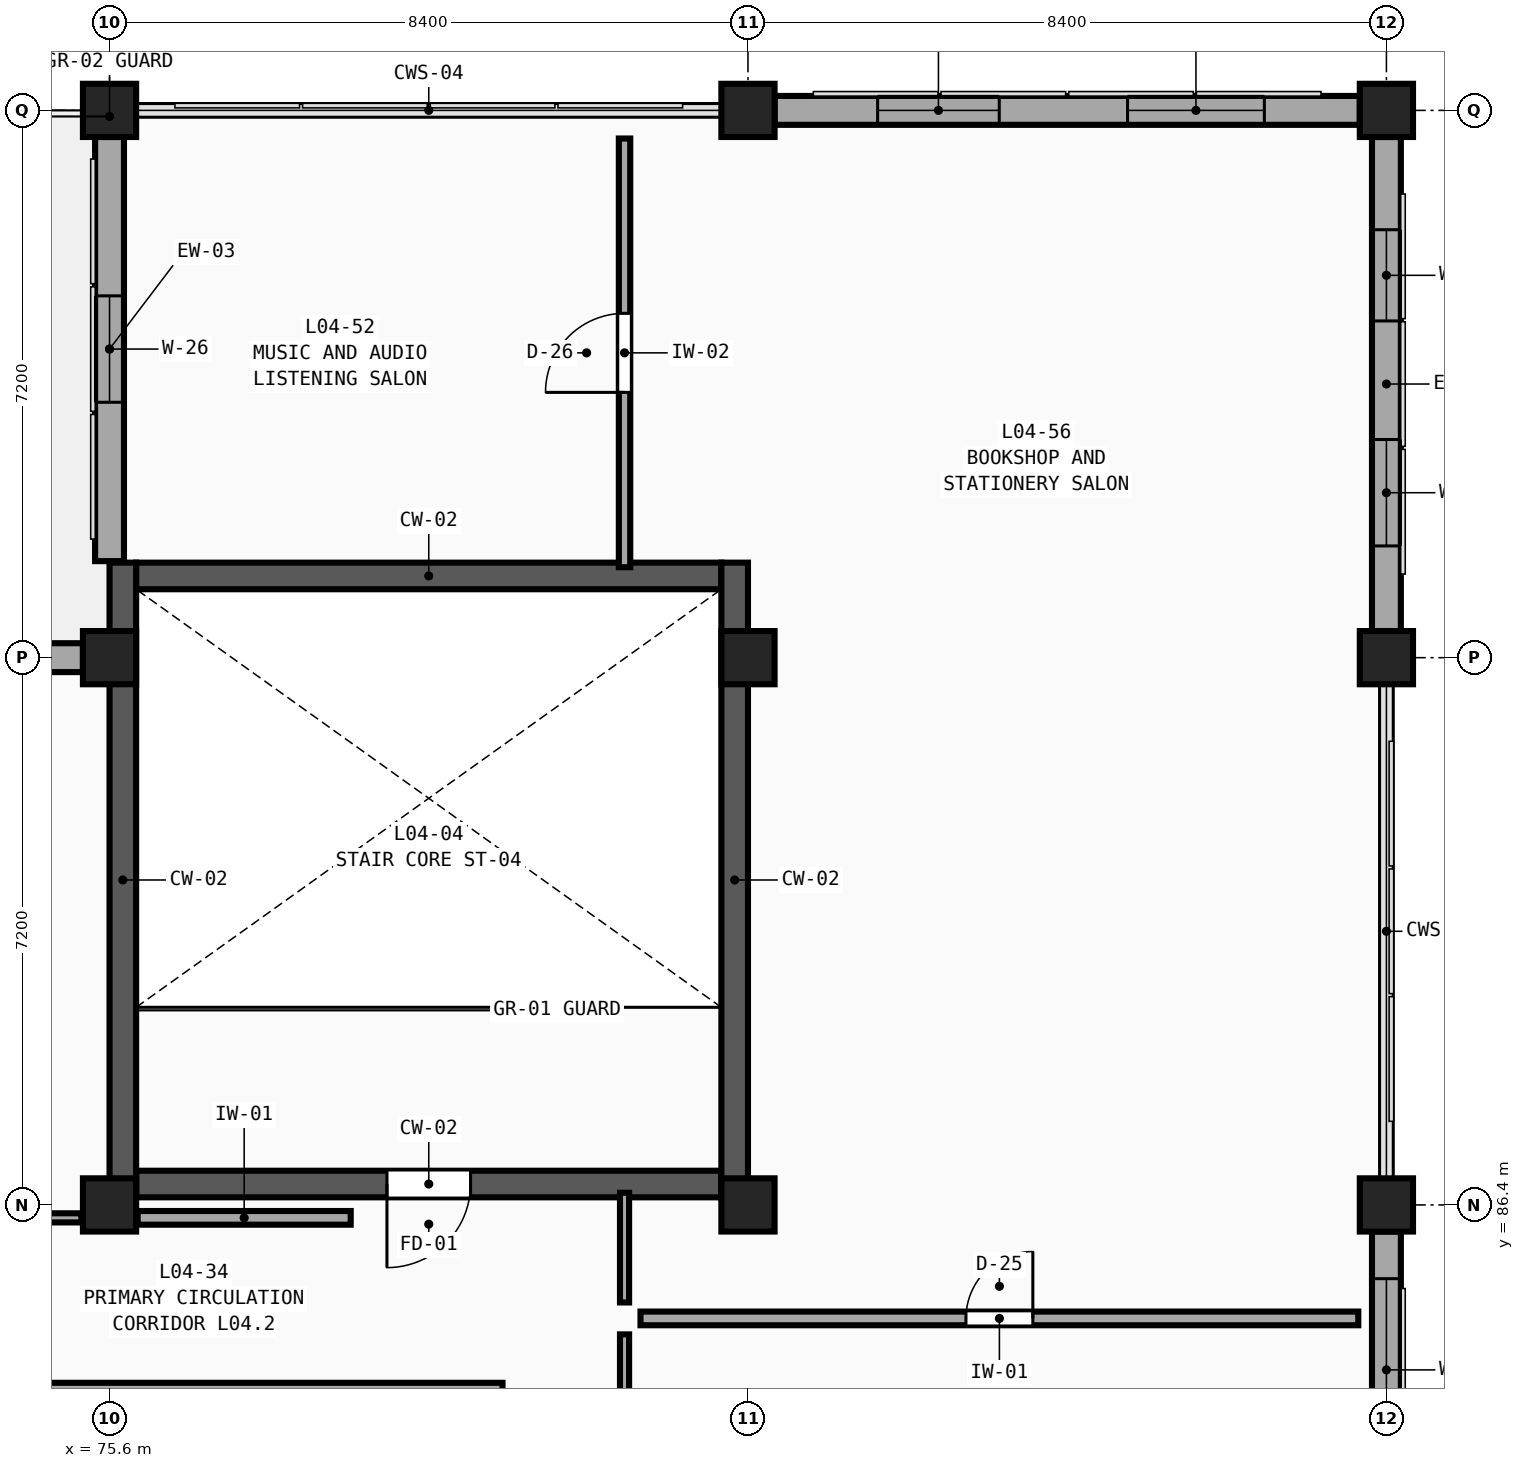
"""IFC4 building model, lengths in metres.
Left out: names, types, materials, properties, quantities, classifications, styles, units other than length and angle.
Written with IfcOpenShell. Run it as: python <this file> out.ifc"""

import sys

from ifc_helpers import new_model, si_unit, direction, frame, frame_2d, origin, origin_2d, place, context, subcontext, project, spatial, rectangle, extrude, element, fill, save


model = new_model("IFC4")
c1 = context("Model", 3, precision=1e-05, world=origin(), true_north=direction((0.0, 1.0)))
c2 = subcontext(c1, "Body", "Model", "MODEL_VIEW")
j1 = project(units=[si_unit("LENGTHUNIT", "METRE"), si_unit("PLANEANGLEUNIT", "RADIAN")], contexts=[c1])
p1 = place(None, origin())
s1 = spatial("IfcSite", under=j1, at=p1, CompositionType="ELEMENT")
p2 = place(p1, origin())
s2 = spatial("IfcBuilding", under=s1, at=p2, CompositionType="ELEMENT")
p3 = place(p2, frame((0.0, 0.0, 18.9)))
s3 = spatial("IfcBuildingStorey", under=s2, at=p3, CompositionType="ELEMENT", Elevation=18.9)
for number, where, z_axis, x_axis in (
    (1, (75.6, 86.4, 0.0), (0.0, 0.0, 1.0), (1.0, 0.0, 0.0)),
    (2, (75.6, 93.6, 0.0), (0.0, 0.0, 1.0), (1.0, 0.0, 0.0)),
    (3, (75.6, 100.8, 0.0), (0.0, 0.0, 1.0), (1.0, 0.0, 0.0)),
    (4, (84.0, 86.4, 0.0), (0.0, 0.0, 1.0), (1.0, 0.0, 0.0)),
    (5, (84.0, 93.6, 0.0), (0.0, 0.0, 1.0), (1.0, 0.0, 0.0)),
    (6, (84.0, 100.8, 0.0), (0.0, 0.0, 1.0), (1.0, 0.0, 0.0)),
    (7, (92.4, 86.4, 0.0), (0.0, 0.0, 1.0), (1.0, 0.0, 0.0)),
    (8, (92.4, 93.6, 0.0), (0.0, 0.0, 1.0), (1.0, 0.0, 0.0)),
    (9, (92.4, 100.8, 0.0), (0.0, 0.0, 1.0), (1.0, 0.0, 0.0)),
):
    element("IfcColumn", number, at=place(p3, frame(where, z_axis=z_axis, x_axis=x_axis)), inside=s3, PredefinedType="COLUMN", context=c2, shape_type="SweptSolid", body=[
        extrude(rectangle(XDim=0.7, YDim=0.7, at=origin_2d()), origin(), (0.0, 0.0, 1.0), 4.5),
    ])
p4 = place(p3, frame((67.55, 93.6, 0.0), z_axis=(0.0, 0.0, 1.0), x_axis=(1.0, 0.0, 0.0)))
e10 = element("IfcWall", 10, at=p4, inside=s3, PredefinedType="SOLIDWALL", context=c2, shape_type="SweptSolid", body=[
    extrude(rectangle(XDim=7.7, YDim=0.38, at=frame_2d((3.85, 0.0))), origin(), (0.0, 0.0, 1.0), 3.63),
])
p5 = place(p4, frame((2.65, 0.0, 0.75)))
e11 = element("IfcOpeningElement", 11, at=p5, cuts=e10, PredefinedType="OPENING", context=c2, shape_type="SweptSolid", body=[
    extrude(rectangle(XDim=2.4, YDim=2.26, at=frame_2d((1.2, 1.13))), frame((0.0, 0.21, 0.0), z_axis=(0.0, -1.0, 0.0), x_axis=(1.0, 0.0, 0.0)), (0.0, 0.0, 1.0), 0.42),
])
p6 = place(p3, frame((75.6, 94.87, 0.0), z_axis=(0.0, 0.0, 1.0), x_axis=(0.0, 1.0, 0.0)))
e12 = element("IfcWall", 12, at=p6, inside=s3, PredefinedType="SOLIDWALL", context=c2, shape_type="SweptSolid", body=[
    extrude(rectangle(XDim=5.58, YDim=0.38, at=frame_2d((2.79, 0.0))), origin(), (0.0, 0.0, 1.0), 3.63),
])
p7 = place(p6, frame((2.09, 0.0, 0.75)))
e13 = element("IfcOpeningElement", 13, at=p7, cuts=e12, PredefinedType="OPENING", context=c2, shape_type="SweptSolid", body=[
    extrude(rectangle(XDim=1.4, YDim=2.44, at=frame_2d((0.7, 1.22))), frame((0.0, 0.21, 0.0), z_axis=(0.0, -1.0, 0.0), x_axis=(1.0, 0.0, 0.0)), (0.0, 0.0, 1.0), 0.42),
])
p8 = place(p3, frame((92.4, 86.05, 0.0), z_axis=(0.0, 0.0, 1.0), x_axis=(0.0, -1.0, 0.0)))
e14 = element("IfcWall", 14, at=p8, inside=s3, PredefinedType="SOLIDWALL", context=c2, shape_type="SweptSolid", body=[
    extrude(rectangle(XDim=6.5, YDim=0.38, at=frame_2d((3.25, 0.0))), origin(), (0.0, 0.0, 1.0), 3.63),
])
p9 = place(p8, frame((0.62, 0.0, 0.75)))
e15 = element("IfcOpeningElement", 15, at=p9, cuts=e14, PredefinedType="OPENING", context=c2, shape_type="SweptSolid", body=[
    extrude(rectangle(XDim=2.4, YDim=2.44, at=frame_2d((1.2, 1.22))), frame((0.0, 0.21, 0.0), z_axis=(0.0, -1.0, 0.0), x_axis=(1.0, 0.0, 0.0)), (0.0, 0.0, 1.0), 0.42),
])
p10 = place(p8, frame((3.445, 0.0, 0.75)))
e16 = element("IfcOpeningElement", 16, at=p10, cuts=e14, PredefinedType="OPENING", context=c2, shape_type="SweptSolid", body=[
    extrude(rectangle(XDim=2.47, YDim=2.44, at=frame_2d((1.235, 1.22))), frame((0.0, 0.21, 0.0), z_axis=(0.0, -1.0, 0.0), x_axis=(1.0, 0.0, 0.0)), (0.0, 0.0, 1.0), 0.42),
])
p11 = place(p3, frame((92.4, 100.45, 0.0), z_axis=(0.0, 0.0, 1.0), x_axis=(0.0, -1.0, 0.0)))
e17 = element("IfcWall", 17, at=p11, inside=s3, PredefinedType="SOLIDWALL", context=c2, shape_type="SweptSolid", body=[
    extrude(rectangle(XDim=6.5, YDim=0.38, at=frame_2d((3.25, 0.0))), origin(), (0.0, 0.0, 1.0), 3.63),
])
p12 = place(p11, frame((1.22, 0.0, 0.75)))
e18 = element("IfcOpeningElement", 18, at=p12, cuts=e17, PredefinedType="OPENING", context=c2, shape_type="SweptSolid", body=[
    extrude(rectangle(XDim=1.2, YDim=2.62, at=frame_2d((0.6, 1.31))), frame((0.0, 0.21, 0.0), z_axis=(0.0, -1.0, 0.0), x_axis=(1.0, 0.0, 0.0)), (0.0, 0.0, 1.0), 0.42),
])
p13 = place(p11, frame((3.98, 0.0, 0.75)))
e19 = element("IfcOpeningElement", 19, at=p13, cuts=e17, PredefinedType="OPENING", context=c2, shape_type="SweptSolid", body=[
    extrude(rectangle(XDim=1.4, YDim=2.62, at=frame_2d((0.7, 1.31))), frame((0.0, 0.21, 0.0), z_axis=(0.0, -1.0, 0.0), x_axis=(1.0, 0.0, 0.0)), (0.0, 0.0, 1.0), 0.42),
])
p14 = place(p3, frame((84.35, 100.8, 0.0), z_axis=(0.0, 0.0, 1.0), x_axis=(1.0, 0.0, 0.0)))
e20 = element("IfcWall", 20, at=p14, inside=s3, PredefinedType="SOLIDWALL", context=c2, shape_type="SweptSolid", body=[
    extrude(rectangle(XDim=7.7, YDim=0.38, at=frame_2d((3.85, 0.0))), origin(), (0.0, 0.0, 1.0), 3.63),
])
p15 = place(p14, frame((1.356, 0.0, 0.75)))
e21 = element("IfcOpeningElement", 21, at=p15, cuts=e20, PredefinedType="OPENING", context=c2, shape_type="SweptSolid", body=[
    extrude(rectangle(XDim=1.6, YDim=2.62, at=frame_2d((0.8, 1.31))), frame((0.0, 0.21, 0.0), z_axis=(0.0, -1.0, 0.0), x_axis=(1.0, 0.0, 0.0)), (0.0, 0.0, 1.0), 0.42),
])
p16 = place(p14, frame((4.644, 0.0, 0.75)))
e22 = element("IfcOpeningElement", 22, at=p16, cuts=e20, PredefinedType="OPENING", context=c2, shape_type="SweptSolid", body=[
    extrude(rectangle(XDim=1.8, YDim=2.62, at=frame_2d((0.9, 1.31))), frame((0.0, 0.21, 0.0), z_axis=(0.0, -1.0, 0.0), x_axis=(1.0, 0.0, 0.0)), (0.0, 0.0, 1.0), 0.42),
])
p17 = place(p3, frame((83.65, 86.675, 0.0), z_axis=(0.0, 0.0, 1.0), x_axis=(-1.0, 0.0, 0.0)))
e23 = element("IfcWall", 23, at=p17, inside=s3, PredefinedType="SHEAR", context=c2, shape_type="SweptSolid", body=[
    extrude(rectangle(XDim=7.7, YDim=0.35, at=frame_2d((3.85, 0.0))), origin(), (0.0, 0.0, 1.0), 4.5),
])
p18 = place(p17, frame((3.3, 0.0, 0.0)))
e24 = element("IfcOpeningElement", 24, at=p18, cuts=e23, PredefinedType="OPENING", context=c2, shape_type="SweptSolid", body=[
    extrude(rectangle(XDim=1.1, YDim=2.2, at=frame_2d((0.55, 1.1))), frame((0.0, 0.195, 0.0), z_axis=(0.0, -1.0, 0.0), x_axis=(1.0, 0.0, 0.0)), (0.0, 0.0, 1.0), 0.39),
])
p19 = place(p3, frame((75.95, 94.675, 0.0), z_axis=(0.0, 0.0, 1.0), x_axis=(1.0, 0.0, 0.0)))
e25 = element("IfcWall", 25, at=p19, inside=s3, PredefinedType="SHEAR", context=c2, shape_type="SweptSolid", body=[
    extrude(rectangle(XDim=7.7, YDim=0.35, at=frame_2d((3.85, 0.0))), origin(), (0.0, 0.0, 1.0), 4.5),
])
for number, where, z_axis, x_axis in (
    (26, (75.775, 94.85, 0.0), (0.0, 0.0, 1.0), (0.0, -1.0, 0.0)),
    (27, (83.825, 86.5, 0.0), (0.0, 0.0, 1.0), (0.0, 1.0, 0.0)),
):
    element("IfcWall", number, at=place(p3, frame(where, z_axis=z_axis, x_axis=x_axis)), inside=s3, PredefinedType="SHEAR", context=c2, shape_type="SweptSolid", body=[
        extrude(rectangle(XDim=8.35, YDim=0.35, at=frame_2d((4.175, 0.0))), origin(), (0.0, 0.0, 1.0), 4.5),
    ])
p20 = place(p3, frame((56.92, 83.97, 0.0), z_axis=(0.0, 0.0, 1.0), x_axis=(1.0, 0.0, 0.0)))
e28 = element("IfcWall", 28, at=p20, inside=s3, PredefinedType="PARTITIONING", context=c2, shape_type="SweptSolid", body=[
    extrude(rectangle(XDim=23.85, YDim=0.18, at=frame_2d((11.925, 0.0))), origin(), (0.0, 0.0, 1.0), 4.18),
])
p21 = place(p20, frame((11.485, 0.0, 0.0)))
e29 = element("IfcOpeningElement", 29, at=p21, cuts=e28, PredefinedType="OPENING", context=c2, shape_type="SweptSolid", body=[
    extrude(rectangle(XDim=0.88, YDim=2.37, at=frame_2d((0.44, 1.185))), frame((0.0, 0.11, 0.0), z_axis=(0.0, -1.0, 0.0), x_axis=(1.0, 0.0, 0.0)), (0.0, 0.0, 1.0), 0.22),
])
p22 = place(p3, frame((67.57, 86.23, 0.0), z_axis=(0.0, 0.0, 1.0), x_axis=(1.0, 0.0, 0.0)))
e30 = element("IfcWall", 30, at=p22, inside=s3, PredefinedType="PARTITIONING", context=c2, shape_type="SweptSolid", body=[
    extrude(rectangle(XDim=7.66, YDim=0.12, at=frame_2d((3.83, 0.0))), origin(), (0.0, 0.0, 1.0), 3.73),
])
p23 = place(p22, frame((3.23, 0.0, 0.0)))
e31 = element("IfcOpeningElement", 31, at=p23, cuts=e30, PredefinedType="OPENING", context=c2, shape_type="SweptSolid", body=[
    extrude(rectangle(XDim=1.2, YDim=2.37, at=frame_2d((0.6, 1.185))), frame((0.0, 0.08, 0.0), z_axis=(0.0, -1.0, 0.0), x_axis=(1.0, 0.0, 0.0)), (0.0, 0.0, 1.0), 0.16),
])
p24 = place(p3, frame((75.97, 86.23, 0.0), z_axis=(0.0, 0.0, 1.0), x_axis=(1.0, 0.0, 0.0)))
e32 = element("IfcWall", 32, at=p24, inside=s3, PredefinedType="PARTITIONING", context=c2, shape_type="SweptSolid", body=[
    extrude(rectangle(XDim=2.803, YDim=0.18, at=frame_2d((1.401, 0.0))), origin(), (0.0, 0.0, 1.0), 3.73),
])
p25 = place(p3, frame((82.376, 73.88, 0.0), z_axis=(0.0, 0.0, 1.0), x_axis=(0.0, 1.0, 0.0)))
e33 = element("IfcWall", 33, at=p25, inside=s3, PredefinedType="PARTITIONING", context=c2, shape_type="SweptSolid", body=[
    extrude(rectangle(XDim=10.817, YDim=0.12, at=frame_2d((5.409, 0.0))), origin(), (0.0, 0.0, 1.0), 4.18),
])
p26 = place(p25, frame((2.375, 0.0, 0.0)))
e34 = element("IfcOpeningElement", 34, at=p26, cuts=e33, PredefinedType="OPENING", context=c2, shape_type="SweptSolid", body=[
    extrude(rectangle(XDim=1.68, YDim=2.29, at=frame_2d((0.84, 1.145))), frame((0.0, 0.08, 0.0), z_axis=(0.0, -1.0, 0.0), x_axis=(1.0, 0.0, 0.0)), (0.0, 0.0, 1.0), 0.16),
])
p27 = place(p3, frame((82.586, 84.907, 0.0), z_axis=(0.0, 0.0, 1.0), x_axis=(1.0, 0.0, 0.0)))
e35 = element("IfcWall", 35, at=p27, inside=s3, PredefinedType="PARTITIONING", context=c2, shape_type="SweptSolid", body=[
    extrude(rectangle(XDim=9.444, YDim=0.18, at=frame_2d((4.722, 0.0))), origin(), (0.0, 0.0, 1.0), 4.18),
])
p28 = place(p27, frame((4.282, 0.0, 0.0)))
e36 = element("IfcOpeningElement", 36, at=p28, cuts=e35, PredefinedType="OPENING", context=c2, shape_type="SweptSolid", body=[
    extrude(rectangle(XDim=0.88, YDim=2.37, at=frame_2d((0.44, 1.185))), frame((0.0, 0.11, 0.0), z_axis=(0.0, -1.0, 0.0), x_axis=(1.0, 0.0, 0.0)), (0.0, 0.0, 1.0), 0.22),
])
p29 = place(p3, frame((82.376, 94.79, 0.0), z_axis=(0.0, 0.0, 1.0), x_axis=(0.0, 1.0, 0.0)))
e37 = element("IfcWall", 37, at=p29, inside=s3, PredefinedType="PARTITIONING", context=c2, shape_type="SweptSolid", body=[
    extrude(rectangle(XDim=5.64, YDim=0.15, at=frame_2d((2.82, 0.0))), origin(), (0.0, 0.0, 1.0), 4.18),
])
p30 = place(p29, frame((2.3, 0.0, 0.0)))
e38 = element("IfcOpeningElement", 38, at=p30, cuts=e37, PredefinedType="OPENING", context=c2, shape_type="SweptSolid", body=[
    extrude(rectangle(XDim=1.04, YDim=2.37, at=frame_2d((0.52, 1.185))), frame((0.0, 0.095, 0.0), z_axis=(0.0, -1.0, 0.0), x_axis=(1.0, 0.0, 0.0)), (0.0, 0.0, 1.0), 0.19),
])
p31 = place(p3, frame((82.376, 85.117, 0.0), z_axis=(0.0, 0.0, 1.0), x_axis=(0.0, 1.0, 0.0)))
e39 = element("IfcWall", 39, at=p31, inside=s3, PredefinedType="PARTITIONING", context=c2, shape_type="SweptSolid", body=[
    extrude(rectangle(XDim=1.443, YDim=0.12, at=frame_2d((0.722, 0.0))), origin(), (0.0, 0.0, 1.0), 4.18),
])
p32 = place(p7, origin())
e40 = element("IfcWindow", 40, at=p32, inside=s3, PartitioningType="DOUBLE_PANEL_VERTICAL", PredefinedType="WINDOW", context=c2, shape_type="SweptSolid", body=[
    extrude(rectangle(XDim=1.4, YDim=2.44, at=frame_2d((0.7, 1.22))), frame((0.0, 0.03, 0.0), z_axis=(0.0, -1.0, 0.0), x_axis=(1.0, 0.0, 0.0)), (0.0, 0.0, 1.0), 0.06),
])
fill(e13, e40)
p33 = place(p9, origin())
e41 = element("IfcWindow", 41, at=p33, inside=s3, PartitioningType="TRIPLE_PANEL_VERTICAL", PredefinedType="WINDOW", context=c2, shape_type="SweptSolid", body=[
    extrude(rectangle(XDim=2.4, YDim=2.44, at=frame_2d((1.2, 1.22))), frame((0.0, 0.03, 0.0), z_axis=(0.0, -1.0, 0.0), x_axis=(1.0, 0.0, 0.0)), (0.0, 0.0, 1.0), 0.06),
])
fill(e15, e41)
p34 = place(p12, origin())
e42 = element("IfcWindow", 42, at=p34, inside=s3, PartitioningType="SINGLE_PANEL", PredefinedType="WINDOW", context=c2, shape_type="SweptSolid", body=[
    extrude(rectangle(XDim=1.2, YDim=2.62, at=frame_2d((0.6, 1.31))), frame((0.0, 0.03, 0.0), z_axis=(0.0, -1.0, 0.0), x_axis=(1.0, 0.0, 0.0)), (0.0, 0.0, 1.0), 0.06),
])
fill(e18, e42)
p35 = place(p13, origin())
e43 = element("IfcWindow", 43, at=p35, inside=s3, PartitioningType="DOUBLE_PANEL_VERTICAL", PredefinedType="WINDOW", context=c2, shape_type="SweptSolid", body=[
    extrude(rectangle(XDim=1.4, YDim=2.62, at=frame_2d((0.7, 1.31))), frame((0.0, 0.03, 0.0), z_axis=(0.0, -1.0, 0.0), x_axis=(1.0, 0.0, 0.0)), (0.0, 0.0, 1.0), 0.06),
])
fill(e19, e43)
p36 = place(p15, origin())
e44 = element("IfcWindow", 44, at=p36, inside=s3, PartitioningType="DOUBLE_PANEL_VERTICAL", PredefinedType="WINDOW", context=c2, shape_type="SweptSolid", body=[
    extrude(rectangle(XDim=1.6, YDim=2.62, at=frame_2d((0.8, 1.31))), frame((0.0, 0.03, 0.0), z_axis=(0.0, -1.0, 0.0), x_axis=(1.0, 0.0, 0.0)), (0.0, 0.0, 1.0), 0.06),
])
fill(e21, e44)
p37 = place(p16, origin())
e45 = element("IfcWindow", 45, at=p37, inside=s3, PartitioningType="DOUBLE_PANEL_VERTICAL", PredefinedType="WINDOW", context=c2, shape_type="SweptSolid", body=[
    extrude(rectangle(XDim=1.8, YDim=2.62, at=frame_2d((0.9, 1.31))), frame((0.0, 0.03, 0.0), z_axis=(0.0, -1.0, 0.0), x_axis=(1.0, 0.0, 0.0)), (0.0, 0.0, 1.0), 0.06),
])
fill(e22, e45)
p38 = place(p18, origin())
e46 = element("IfcDoor", 46, at=p38, inside=s3, OperationType="SINGLE_SWING_RIGHT", PredefinedType="DOOR", context=c2, shape_type="SweptSolid", body=[
    extrude(rectangle(XDim=1.1, YDim=2.2, at=frame_2d((0.55, 1.1))), frame((0.0, 0.025, 0.0), z_axis=(0.0, -1.0, 0.0), x_axis=(1.0, 0.0, 0.0)), (0.0, 0.0, 1.0), 0.05),
])
fill(e24, e46)
p39 = place(p28, origin())
e47 = element("IfcDoor", 47, at=p39, inside=s3, OperationType="SINGLE_SWING_RIGHT", PredefinedType="DOOR", context=c2, shape_type="SweptSolid", body=[
    extrude(rectangle(XDim=0.88, YDim=2.37, at=frame_2d((0.44, 1.185))), frame((0.0, 0.025, 0.0), z_axis=(0.0, -1.0, 0.0), x_axis=(1.0, 0.0, 0.0)), (0.0, 0.0, 1.0), 0.05),
])
fill(e36, e47)
p40 = place(p30, origin())
e48 = element("IfcDoor", 48, at=p40, inside=s3, OperationType="SINGLE_SWING_LEFT", PredefinedType="DOOR", context=c2, shape_type="SweptSolid", body=[
    extrude(rectangle(XDim=1.04, YDim=2.37, at=frame_2d((0.52, 1.185))), frame((0.0, 0.025, 0.0), z_axis=(0.0, -1.0, 0.0), x_axis=(1.0, 0.0, 0.0)), (0.0, 0.0, 1.0), 0.05),
])
fill(e38, e48)
save(model, sys.argv[1])
